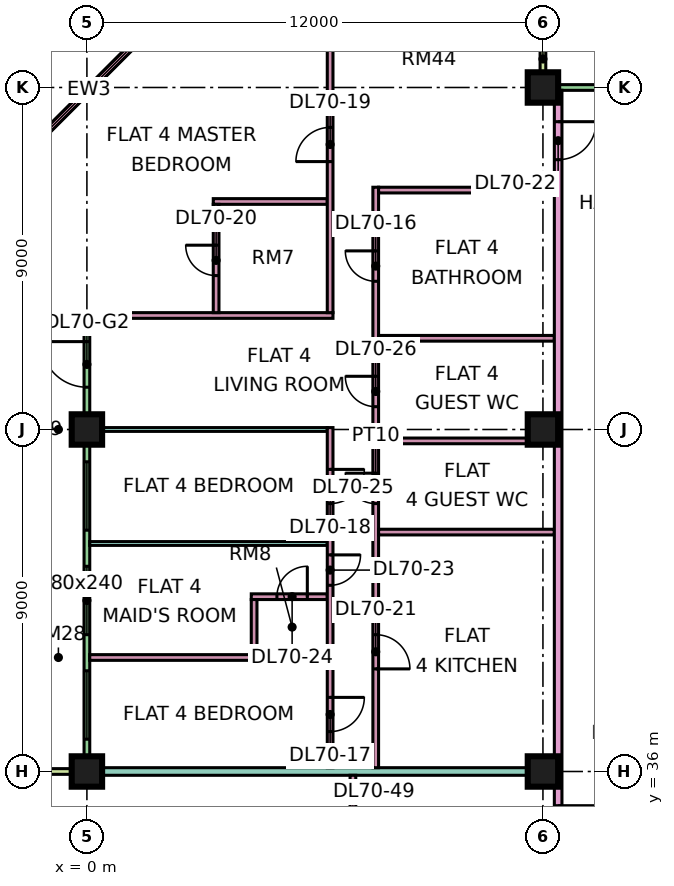
"""IFC4 building model, lengths in metres.
Left out: names, types, materials, properties, quantities, classifications, styles, units other than length and angle.
Written with IfcOpenShell. Run it as: python <this file> out.ifc"""

import sys

from ifc_helpers import new_model, si_unit, direction, frame, frame_2d, origin, origin_2d, place, context, subcontext, project, spatial, rectangle, extrude, element, fill, save


model = new_model("IFC4")
c1 = context("Model", 3, precision=1e-05, world=origin(), true_north=direction((0.0, 1.0)))
c2 = subcontext(c1, "Body", "Model", "MODEL_VIEW")
j1 = project(units=[si_unit("LENGTHUNIT", "METRE"), si_unit("PLANEANGLEUNIT", "RADIAN")], contexts=[c1])
p1 = place(None, origin())
s1 = spatial("IfcSite", under=j1, at=p1, CompositionType="ELEMENT")
p2 = place(p1, origin())
s2 = spatial("IfcBuilding", under=s1, at=p2, CompositionType="ELEMENT")
p3 = place(p2, frame((0.0, 0.0, 299.65)))
s3 = spatial("IfcBuildingStorey", under=s2, at=p3, CompositionType="ELEMENT", Elevation=299.65)
p4 = place(p3, frame((0.0, 36.0, 0.0), z_axis=(0.0, 0.0, 1.0), x_axis=(1.0, 0.0, 0.0)))
e1 = element("IfcColumn", 1, at=p4, inside=s3, PredefinedType="COLUMN", context=c2, shape_type="SweptSolid", body=[
    extrude(rectangle(XDim=0.8, YDim=0.8, at=origin_2d()), origin(), (0.0, 0.0, 1.0), 3.75),
])
for number, where, z_axis, x_axis in (
    (2, (0.0, 45.0, 0.0), (0.0, 0.0, 1.0), (1.0, 0.0, 0.0)),
    (3, (12.0, 36.0, 0.0), (0.0, 0.0, 1.0), (1.0, 0.0, 0.0)),
    (4, (12.0, 45.0, 0.0), (0.0, 0.0, 1.0), (1.0, 0.0, 0.0)),
    (5, (12.0, 54.0, 0.0), (0.0, 0.0, 1.0), (1.0, 0.0, 0.0)),
):
    element("IfcColumn", number, at=place(p3, frame(where, z_axis=z_axis, x_axis=x_axis)), inside=s3, PredefinedType="COLUMN", context=c2, shape_type="SweptSolid", body=[
        extrude(rectangle(XDim=0.8, YDim=0.8, at=origin_2d()), origin(), (0.0, 0.0, 1.0), 3.75),
    ])
p5 = place(p3, frame((22.425, 54.0, 0.0), z_axis=(0.0, 0.0, 1.0), x_axis=(-1.0, 0.0, 0.0)))
e6 = element("IfcWall", 6, at=p5, inside=s3, PredefinedType="SOLIDWALL", context=c2, shape_type="SweptSolid", body=[
    extrude(rectangle(XDim=10.35, YDim=0.15, at=frame_2d((5.175, 0.0))), origin(), (0.0, 0.0, 1.0), 3.35),
])
p6 = place(p5, frame((1.012, 0.0, 0.45)))
e7 = element("IfcOpeningElement", 7, at=p6, cuts=e6, PredefinedType="OPENING", context=c2, shape_type="SweptSolid", body=[
    extrude(rectangle(XDim=4.8, YDim=2.4, at=frame_2d((2.4, 1.2))), frame((0.0, 0.085, 0.0), z_axis=(0.0, -1.0, 0.0), x_axis=(1.0, 0.0, 0.0)), (0.0, 0.0, 1.0), 0.17),
])
p7 = place(p3, frame((12.0, 55.5, 0.0), z_axis=(0.0, 0.0, 1.0), x_axis=(0.0, -1.0, 0.0)))
e8 = element("IfcWall", 8, at=p7, inside=s3, PredefinedType="SOLIDWALL", context=c2, shape_type="SweptSolid", body=[
    extrude(rectangle(XDim=1.5, YDim=0.15, at=frame_2d((0.75, 0.0))), origin(), (0.0, 0.0, 1.0), 3.35),
])
p8 = place(p3, frame((1.553, 55.447, 0.0), z_axis=(0.0, 0.0, 1.0), x_axis=(-0.707106781187, -0.707106781187, 0.0)))
e9 = element("IfcWall", 9, at=p8, inside=s3, PredefinedType="SOLIDWALL", context=c2, shape_type="SweptSolid", body=[
    extrude(rectangle(XDim=4.243, YDim=0.15, at=frame_2d((2.121, 0.0))), origin(), (0.0, 0.0, 1.0), 3.35),
])
p9 = place(p8, frame((0.621, 0.0, 0.45)))
e10 = element("IfcOpeningElement", 10, at=p9, cuts=e9, PredefinedType="OPENING", context=c2, shape_type="SweptSolid", body=[
    extrude(rectangle(XDim=3.0, YDim=2.4, at=frame_2d((1.5, 1.2))), frame((0.0, 0.085, 0.0), z_axis=(0.0, -1.0, 0.0), x_axis=(1.0, 0.0, 0.0)), (0.0, 0.0, 1.0), 0.17),
])
p10 = place(p3, frame((0.0, 47.925, 0.0), z_axis=(0.0, 0.0, 1.0), x_axis=(0.0, -1.0, 0.0)))
e11 = element("IfcWall", 11, at=p10, inside=s3, PredefinedType="SOLIDWALL", context=c2, shape_type="SweptSolid", body=[
    extrude(rectangle(XDim=11.85, YDim=0.15, at=frame_2d((5.925, 0.0))), origin(), (0.0, 0.0, 1.0), 3.35),
])
p11 = place(p10, frame((0.613, 0.0, 0.0)))
e12 = element("IfcOpeningElement", 12, at=p11, cuts=e11, PredefinedType="OPENING", context=c2, shape_type="SweptSolid", body=[
    extrude(rectangle(XDim=1.2, YDim=2.4, at=frame_2d((0.6, 1.2))), frame((0.0, 0.085, 0.0), z_axis=(0.0, -1.0, 0.0), x_axis=(1.0, 0.0, 0.0)), (0.0, 0.0, 1.0), 0.17),
])
p12 = place(p10, frame((3.775, 0.0, 0.45)))
e13 = element("IfcOpeningElement", 13, at=p12, cuts=e11, PredefinedType="OPENING", context=c2, shape_type="SweptSolid", body=[
    extrude(rectangle(XDim=1.8, YDim=2.4, at=frame_2d((0.9, 1.2))), frame((0.0, 0.085, 0.0), z_axis=(0.0, -1.0, 0.0), x_axis=(1.0, 0.0, 0.0)), (0.0, 0.0, 1.0), 0.17),
])
p13 = place(p10, frame((6.525, 0.0, 0.45)))
e14 = element("IfcOpeningElement", 14, at=p13, cuts=e11, PredefinedType="OPENING", context=c2, shape_type="SweptSolid", body=[
    extrude(rectangle(XDim=1.8, YDim=2.4, at=frame_2d((0.9, 1.2))), frame((0.0, 0.085, 0.0), z_axis=(0.0, -1.0, 0.0), x_axis=(1.0, 0.0, 0.0)), (0.0, 0.0, 1.0), 0.17),
])
p14 = place(p10, frame((9.275, 0.0, 0.45)))
e15 = element("IfcOpeningElement", 15, at=p14, cuts=e11, PredefinedType="OPENING", context=c2, shape_type="SweptSolid", body=[
    extrude(rectangle(XDim=1.8, YDim=2.4, at=frame_2d((0.9, 1.2))), frame((0.0, 0.085, 0.0), z_axis=(0.0, -1.0, 0.0), x_axis=(1.0, 0.0, 0.0)), (0.0, 0.0, 1.0), 0.17),
])
for number, where, z_axis, x_axis in (
    (16, (-1.5, 48.0, 0.0), (0.0, 0.0, 1.0), (1.0, 0.0, 0.0)),
    (17, (-1.5, 36.0, 0.0), (0.0, 0.0, 1.0), (1.0, 0.0, 0.0)),
):
    element("IfcWall", number, at=place(p3, frame(where, z_axis=z_axis, x_axis=x_axis)), inside=s3, PredefinedType="SOLIDWALL", context=c2, shape_type="SweptSolid", body=[
        extrude(rectangle(XDim=1.5, YDim=0.15, at=frame_2d((0.75, 0.0))), origin(), (0.0, 0.0, 1.0), 3.35),
    ])
e18 = element("IfcWall", 18, at=p4, inside=s3, PredefinedType="PARTITIONING", context=c2, shape_type="SweptSolid", body=[
    extrude(rectangle(XDim=12.3, YDim=0.2, at=frame_2d((6.15, 0.0))), origin(), (0.0, 0.0, 1.0), 3.35),
])
p15 = place(p3, frame((0.0, 48.0, 0.0), z_axis=(0.0, 0.0, 1.0), x_axis=(1.0, 0.0, 0.0)))
e19 = element("IfcWall", 19, at=p15, inside=s3, PredefinedType="PARTITIONING", context=c2, shape_type="SweptSolid", body=[
    extrude(rectangle(XDim=6.475, YDim=0.15, at=frame_2d((3.238, 0.0))), origin(), (0.0, 0.0, 1.0), 3.35),
])
p16 = place(p3, frame((0.074, 39.0, 0.0), z_axis=(0.0, 0.0, 1.0), x_axis=(1.0, 0.0, 0.0)))
e20 = element("IfcWall", 20, at=p16, inside=s3, PredefinedType="PARTITIONING", context=c2, shape_type="SweptSolid", body=[
    extrude(rectangle(XDim=6.251, YDim=0.15, at=frame_2d((3.125, 0.0))), origin(), (0.0, 0.0, 1.0), 3.35),
])
for number, where, z_axis, x_axis in (
    (21, (0.074, 42.0, 0.0), (0.0, 0.0, 1.0), (1.0, 0.0, 0.0)),
    (22, (0.074, 45.0, 0.0), (0.0, 0.0, 1.0), (1.0, 0.0, 0.0)),
):
    element("IfcWall", number, at=place(p3, frame(where, z_axis=z_axis, x_axis=x_axis)), inside=s3, PredefinedType="PARTITIONING", context=c2, shape_type="SweptSolid", body=[
        extrude(rectangle(XDim=6.251, YDim=0.1, at=frame_2d((3.125, 0.0))), origin(), (0.0, 0.0, 1.0), 3.35),
    ])
p17 = place(p3, frame((3.325, 51.0, 0.0), z_axis=(0.0, 0.0, 1.0), x_axis=(1.0, 0.0, 0.0)))
e23 = element("IfcWall", 23, at=p17, inside=s3, PredefinedType="PARTITIONING", context=c2, shape_type="SweptSolid", body=[
    extrude(rectangle(XDim=3.0, YDim=0.15, at=frame_2d((1.5, 0.0))), origin(), (0.0, 0.0, 1.0), 3.35),
])
p18 = place(p3, frame((3.4, 48.075, 0.0), z_axis=(0.0, 0.0, 1.0), x_axis=(0.0, 1.0, 0.0)))
e24 = element("IfcWall", 24, at=p18, inside=s3, PredefinedType="PARTITIONING", context=c2, shape_type="SweptSolid", body=[
    extrude(rectangle(XDim=2.85, YDim=0.15, at=frame_2d((1.425, 0.0))), origin(), (0.0, 0.0, 1.0), 3.35),
])
p19 = place(p18, frame((0.975, 0.0, 0.0)))
e25 = element("IfcOpeningElement", 25, at=p19, cuts=e24, PredefinedType="OPENING", context=c2, shape_type="SweptSolid", body=[
    extrude(rectangle(XDim=0.8, YDim=2.1, at=frame_2d((0.4, 1.05))), frame((0.0, 0.085, 0.0), z_axis=(0.0, -1.0, 0.0), x_axis=(1.0, 0.0, 0.0)), (0.0, 0.0, 1.0), 0.17),
])
p20 = place(p3, frame((4.325, 40.6, 0.0), z_axis=(0.0, 0.0, 1.0), x_axis=(1.0, 0.0, 0.0)))
e26 = element("IfcWall", 26, at=p20, inside=s3, PredefinedType="PARTITIONING", context=c2, shape_type="SweptSolid", body=[
    extrude(rectangle(XDim=2.0, YDim=0.15, at=frame_2d((1.0, 0.0))), origin(), (0.0, 0.0, 1.0), 3.35),
])
p21 = place(p20, frame((0.675, 0.0, 0.0)))
e27 = element("IfcOpeningElement", 27, at=p21, cuts=e26, PredefinedType="OPENING", context=c2, shape_type="SweptSolid", body=[
    extrude(rectangle(XDim=0.8, YDim=2.1, at=frame_2d((0.4, 1.05))), frame((0.0, 0.085, 0.0), z_axis=(0.0, -1.0, 0.0), x_axis=(1.0, 0.0, 0.0)), (0.0, 0.0, 1.0), 0.17),
])
p22 = place(p3, frame((4.4, 39.075, 0.0), z_axis=(0.0, 0.0, 1.0), x_axis=(0.0, 1.0, 0.0)))
e28 = element("IfcWall", 28, at=p22, inside=s3, PredefinedType="PARTITIONING", context=c2, shape_type="SweptSolid", body=[
    extrude(rectangle(XDim=1.45, YDim=0.15, at=frame_2d((0.725, 0.0))), origin(), (0.0, 0.0, 1.0), 3.35),
])
p23 = place(p3, frame((6.4, 36.1, 0.0), z_axis=(0.0, 0.0, 1.0), x_axis=(0.0, 1.0, 0.0)))
e29 = element("IfcWall", 29, at=p23, inside=s3, PredefinedType="PARTITIONING", context=c2, shape_type="SweptSolid", body=[
    extrude(rectangle(XDim=8.95, YDim=0.15, at=frame_2d((4.475, 0.0))), origin(), (0.0, 0.0, 1.0), 3.35),
])
p24 = place(p23, frame((0.95, 0.0, 0.0)))
e30 = element("IfcOpeningElement", 30, at=p24, cuts=e29, PredefinedType="OPENING", context=c2, shape_type="SweptSolid", body=[
    extrude(rectangle(XDim=0.9, YDim=2.1, at=frame_2d((0.45, 1.05))), frame((0.0, 0.085, 0.0), z_axis=(0.0, -1.0, 0.0), x_axis=(1.0, 0.0, 0.0)), (0.0, 0.0, 1.0), 0.17),
])
p25 = place(p23, frame((6.95, 0.0, 0.0)))
e31 = element("IfcOpeningElement", 31, at=p25, cuts=e29, PredefinedType="OPENING", context=c2, shape_type="SweptSolid", body=[
    extrude(rectangle(XDim=0.9, YDim=2.1, at=frame_2d((0.45, 1.05))), frame((0.0, 0.085, 0.0), z_axis=(0.0, -1.0, 0.0), x_axis=(1.0, 0.0, 0.0)), (0.0, 0.0, 1.0), 0.17),
])
p26 = place(p23, frame((4.8, 0.0, 0.0)))
e32 = element("IfcOpeningElement", 32, at=p26, cuts=e29, PredefinedType="OPENING", context=c2, shape_type="SweptSolid", body=[
    extrude(rectangle(XDim=0.8, YDim=2.1, at=frame_2d((0.4, 1.05))), frame((0.0, 0.085, 0.0), z_axis=(0.0, -1.0, 0.0), x_axis=(1.0, 0.0, 0.0)), (0.0, 0.0, 1.0), 0.17),
])
p27 = place(p3, frame((6.4, 48.075, 0.0), z_axis=(0.0, 0.0, 1.0), x_axis=(0.0, 1.0, 0.0)))
e33 = element("IfcWall", 33, at=p27, inside=s3, PredefinedType="PARTITIONING", context=c2, shape_type="SweptSolid", body=[
    extrude(rectangle(XDim=7.275, YDim=0.15, at=frame_2d((3.638, 0.0))), origin(), (0.0, 0.0, 1.0), 3.35),
])
p28 = place(p27, frame((3.975, 0.0, 0.0)))
e34 = element("IfcOpeningElement", 34, at=p28, cuts=e33, PredefinedType="OPENING", context=c2, shape_type="SweptSolid", body=[
    extrude(rectangle(XDim=0.9, YDim=2.1, at=frame_2d((0.45, 1.05))), frame((0.0, 0.085, 0.0), z_axis=(0.0, -1.0, 0.0), x_axis=(1.0, 0.0, 0.0)), (0.0, 0.0, 1.0), 0.17),
])
p29 = place(p3, frame((7.0, 30.075, 0.0), z_axis=(0.0, 0.0, 1.0), x_axis=(0.0, 1.0, 0.0)))
e35 = element("IfcWall", 35, at=p29, inside=s3, PredefinedType="PARTITIONING", context=c2, shape_type="SweptSolid", body=[
    extrude(rectangle(XDim=5.825, YDim=0.15, at=frame_2d((2.913, 0.0))), origin(), (0.0, 0.0, 1.0), 3.35),
])
p30 = place(p29, frame((3.975, 0.0, 0.0)))
e36 = element("IfcOpeningElement", 36, at=p30, cuts=e35, PredefinedType="OPENING", context=c2, shape_type="SweptSolid", body=[
    extrude(rectangle(XDim=0.9, YDim=2.1, at=frame_2d((0.45, 1.05))), frame((0.0, 0.085, 0.0), z_axis=(0.0, -1.0, 0.0), x_axis=(1.0, 0.0, 0.0)), (0.0, 0.0, 1.0), 0.17),
])
p31 = place(p3, frame((7.6, 36.1, 0.0), z_axis=(0.0, 0.0, 1.0), x_axis=(0.0, 1.0, 0.0)))
e37 = element("IfcWall", 37, at=p31, inside=s3, PredefinedType="PARTITIONING", context=c2, shape_type="SweptSolid", body=[
    extrude(rectangle(XDim=15.275, YDim=0.15, at=frame_2d((7.637, 0.0))), origin(), (0.0, 0.0, 1.0), 3.35),
])
p32 = place(p31, frame((12.8, 0.0, 0.0)))
e38 = element("IfcOpeningElement", 38, at=p32, cuts=e37, PredefinedType="OPENING", context=c2, shape_type="SweptSolid", body=[
    extrude(rectangle(XDim=0.8, YDim=2.1, at=frame_2d((0.4, 1.05))), frame((0.0, 0.085, 0.0), z_axis=(0.0, -1.0, 0.0), x_axis=(1.0, 0.0, 0.0)), (0.0, 0.0, 1.0), 0.17),
])
p33 = place(p31, frame((2.6, 0.0, 0.0)))
e39 = element("IfcOpeningElement", 39, at=p33, cuts=e37, PredefinedType="OPENING", context=c2, shape_type="SweptSolid", body=[
    extrude(rectangle(XDim=0.9, YDim=2.1, at=frame_2d((0.45, 1.05))), frame((0.0, 0.085, 0.0), z_axis=(0.0, -1.0, 0.0), x_axis=(1.0, 0.0, 0.0)), (0.0, 0.0, 1.0), 0.17),
])
p34 = place(p31, frame((6.95, 0.0, 0.0)))
e40 = element("IfcOpeningElement", 40, at=p34, cuts=e37, PredefinedType="OPENING", context=c2, shape_type="SweptSolid", body=[
    extrude(rectangle(XDim=0.8, YDim=2.1, at=frame_2d((0.4, 1.05))), frame((0.0, 0.085, 0.0), z_axis=(0.0, -1.0, 0.0), x_axis=(1.0, 0.0, 0.0)), (0.0, 0.0, 1.0), 0.17),
])
p35 = place(p31, frame((9.5, 0.0, 0.0)))
e41 = element("IfcOpeningElement", 41, at=p35, cuts=e37, PredefinedType="OPENING", context=c2, shape_type="SweptSolid", body=[
    extrude(rectangle(XDim=0.8, YDim=2.1, at=frame_2d((0.4, 1.05))), frame((0.0, 0.085, 0.0), z_axis=(0.0, -1.0, 0.0), x_axis=(1.0, 0.0, 0.0)), (0.0, 0.0, 1.0), 0.17),
])
for number, where, z_axis, x_axis in (
    (42, (7.675, 42.3, 0.0), (0.0, 0.0, 1.0), (1.0, 0.0, 0.0)),
    (43, (7.675, 44.7, 0.0), (0.0, 0.0, 1.0), (1.0, 0.0, 0.0)),
    (44, (7.675, 47.4, 0.0), (0.0, 0.0, 1.0), (1.0, 0.0, 0.0)),
    (45, (7.675, 51.3, 0.0), (0.0, 0.0, 1.0), (1.0, 0.0, 0.0)),
):
    element("IfcWall", number, at=place(p3, frame(where, z_axis=z_axis, x_axis=x_axis)), inside=s3, PredefinedType="PARTITIONING", context=c2, shape_type="SweptSolid", body=[
        extrude(rectangle(XDim=4.625, YDim=0.15, at=frame_2d((2.312, 0.0))), origin(), (0.0, 0.0, 1.0), 3.35),
    ])
p36 = place(p3, frame((12.4, 20.0, 0.0), z_axis=(0.0, 0.0, 1.0), x_axis=(0.0, 1.0, 0.0)))
e46 = element("IfcWall", 46, at=p36, inside=s3, PredefinedType="PARTITIONING", context=c2, shape_type="SweptSolid", body=[
    extrude(rectangle(XDim=33.926, YDim=0.2, at=frame_2d((16.963, 0.0))), origin(), (0.0, 0.0, 1.0), 3.35),
])
p37 = place(p36, frame((32.1, 0.0, 0.0)))
e47 = element("IfcOpeningElement", 47, at=p37, cuts=e46, PredefinedType="OPENING", context=c2, shape_type="SweptSolid", body=[
    extrude(rectangle(XDim=1.0, YDim=2.1, at=frame_2d((0.5, 1.05))), frame((0.0, 0.11, 0.0), z_axis=(0.0, -1.0, 0.0), x_axis=(1.0, 0.0, 0.0)), (0.0, 0.0, 1.0), 0.22),
])
p38 = place(p36, frame((0.6, 0.0, 0.0)))
e48 = element("IfcOpeningElement", 48, at=p38, cuts=e46, PredefinedType="OPENING", context=c2, shape_type="SweptSolid", body=[
    extrude(rectangle(XDim=1.2, YDim=2.1, at=frame_2d((0.6, 1.05))), frame((0.0, 0.11, 0.0), z_axis=(0.0, -1.0, 0.0), x_axis=(1.0, 0.0, 0.0)), (0.0, 0.0, 1.0), 0.22),
])
p39 = place(p36, frame((14.1, 0.0, 0.0)))
e49 = element("IfcOpeningElement", 49, at=p39, cuts=e46, PredefinedType="OPENING", context=c2, shape_type="SweptSolid", body=[
    extrude(rectangle(XDim=1.0, YDim=2.1, at=frame_2d((0.5, 1.05))), frame((0.0, 0.11, 0.0), z_axis=(0.0, -1.0, 0.0), x_axis=(1.0, 0.0, 0.0)), (0.0, 0.0, 1.0), 0.22),
])
p40 = place(p9, origin())
e50 = element("IfcWindow", 50, at=p40, inside=s3, PartitioningType="SINGLE_PANEL", PredefinedType="WINDOW", context=c2, shape_type="SweptSolid", body=[
    extrude(rectangle(XDim=3.0, YDim=2.4, at=frame_2d((1.5, 1.2))), frame((0.0, 0.03, 0.0), z_axis=(0.0, -1.0, 0.0), x_axis=(1.0, 0.0, 0.0)), (0.0, 0.0, 1.0), 0.06),
])
fill(e10, e50)
p41 = place(p11, frame((1.2, 0.0, 0.0), z_axis=(0.0, 0.0, 1.0), x_axis=(-1.0, 0.0, 0.0)))
e51 = element("IfcDoor", 51, at=p41, inside=s3, OperationType="DOUBLE_DOOR_SINGLE_SWING", PredefinedType="DOOR", context=c2, shape_type="SweptSolid", body=[
    extrude(rectangle(XDim=1.2, YDim=2.4, at=frame_2d((0.6, 1.2))), frame((0.0, 0.025, 0.0), z_axis=(0.0, -1.0, 0.0), x_axis=(1.0, 0.0, 0.0)), (0.0, 0.0, 1.0), 0.05),
])
fill(e12, e51)
p42 = place(p12, origin())
e52 = element("IfcWindow", 52, at=p42, inside=s3, PartitioningType="SINGLE_PANEL", PredefinedType="WINDOW", context=c2, shape_type="SweptSolid", body=[
    extrude(rectangle(XDim=1.8, YDim=2.4, at=frame_2d((0.9, 1.2))), frame((0.0, 0.03, 0.0), z_axis=(0.0, -1.0, 0.0), x_axis=(1.0, 0.0, 0.0)), (0.0, 0.0, 1.0), 0.06),
])
fill(e13, e52)
p43 = place(p13, origin())
e53 = element("IfcWindow", 53, at=p43, inside=s3, PartitioningType="SINGLE_PANEL", PredefinedType="WINDOW", context=c2, shape_type="SweptSolid", body=[
    extrude(rectangle(XDim=1.8, YDim=2.4, at=frame_2d((0.9, 1.2))), frame((0.0, 0.03, 0.0), z_axis=(0.0, -1.0, 0.0), x_axis=(1.0, 0.0, 0.0)), (0.0, 0.0, 1.0), 0.06),
])
fill(e14, e53)
p44 = place(p14, origin())
e54 = element("IfcWindow", 54, at=p44, inside=s3, PartitioningType="SINGLE_PANEL", PredefinedType="WINDOW", context=c2, shape_type="SweptSolid", body=[
    extrude(rectangle(XDim=1.8, YDim=2.4, at=frame_2d((0.9, 1.2))), frame((0.0, 0.03, 0.0), z_axis=(0.0, -1.0, 0.0), x_axis=(1.0, 0.0, 0.0)), (0.0, 0.0, 1.0), 0.06),
])
fill(e15, e54)
p45 = place(p32, frame((0.8, 0.0, 0.0), z_axis=(0.0, 0.0, 1.0), x_axis=(-1.0, 0.0, 0.0)))
e55 = element("IfcDoor", 55, at=p45, inside=s3, OperationType="SINGLE_SWING_RIGHT", PredefinedType="DOOR", context=c2, shape_type="SweptSolid", body=[
    extrude(rectangle(XDim=0.8, YDim=2.1, at=frame_2d((0.4, 1.05))), frame((0.0, 0.025, 0.0), z_axis=(0.0, -1.0, 0.0), x_axis=(1.0, 0.0, 0.0)), (0.0, 0.0, 1.0), 0.05),
])
fill(e38, e55)
p46 = place(p24, origin())
e56 = element("IfcDoor", 56, at=p46, inside=s3, OperationType="SINGLE_SWING_RIGHT", PredefinedType="DOOR", context=c2, shape_type="SweptSolid", body=[
    extrude(rectangle(XDim=0.9, YDim=2.1, at=frame_2d((0.45, 1.05))), frame((0.0, 0.025, 0.0), z_axis=(0.0, -1.0, 0.0), x_axis=(1.0, 0.0, 0.0)), (0.0, 0.0, 1.0), 0.05),
])
fill(e30, e56)
p47 = place(p25, origin())
e57 = element("IfcDoor", 57, at=p47, inside=s3, OperationType="SINGLE_SWING_RIGHT", PredefinedType="DOOR", context=c2, shape_type="SweptSolid", body=[
    extrude(rectangle(XDim=0.9, YDim=2.1, at=frame_2d((0.45, 1.05))), frame((0.0, 0.025, 0.0), z_axis=(0.0, -1.0, 0.0), x_axis=(1.0, 0.0, 0.0)), (0.0, 0.0, 1.0), 0.05),
])
fill(e31, e57)
p48 = place(p28, origin())
e58 = element("IfcDoor", 58, at=p48, inside=s3, OperationType="SINGLE_SWING_LEFT", PredefinedType="DOOR", context=c2, shape_type="SweptSolid", body=[
    extrude(rectangle(XDim=0.9, YDim=2.1, at=frame_2d((0.45, 1.05))), frame((0.0, 0.025, 0.0), z_axis=(0.0, -1.0, 0.0), x_axis=(1.0, 0.0, 0.0)), (0.0, 0.0, 1.0), 0.05),
])
fill(e34, e58)
p49 = place(p19, frame((0.8, 0.0, 0.0), z_axis=(0.0, 0.0, 1.0), x_axis=(-1.0, 0.0, 0.0)))
e59 = element("IfcDoor", 59, at=p49, inside=s3, OperationType="SINGLE_SWING_RIGHT", PredefinedType="DOOR", context=c2, shape_type="SweptSolid", body=[
    extrude(rectangle(XDim=0.8, YDim=2.1, at=frame_2d((0.4, 1.05))), frame((0.0, 0.025, 0.0), z_axis=(0.0, -1.0, 0.0), x_axis=(1.0, 0.0, 0.0)), (0.0, 0.0, 1.0), 0.05),
])
fill(e25, e59)
p50 = place(p33, frame((0.9, 0.0, 0.0), z_axis=(0.0, 0.0, 1.0), x_axis=(-1.0, 0.0, 0.0)))
e60 = element("IfcDoor", 60, at=p50, inside=s3, OperationType="SINGLE_SWING_LEFT", PredefinedType="DOOR", context=c2, shape_type="SweptSolid", body=[
    extrude(rectangle(XDim=0.9, YDim=2.1, at=frame_2d((0.45, 1.05))), frame((0.0, 0.025, 0.0), z_axis=(0.0, -1.0, 0.0), x_axis=(1.0, 0.0, 0.0)), (0.0, 0.0, 1.0), 0.05),
])
fill(e39, e60)
p51 = place(p37, origin())
e61 = element("IfcDoor", 61, at=p51, inside=s3, OperationType="SINGLE_SWING_RIGHT", PredefinedType="DOOR", context=c2, shape_type="SweptSolid", body=[
    extrude(rectangle(XDim=1.0, YDim=2.1, at=frame_2d((0.5, 1.05))), frame((0.0, 0.025, 0.0), z_axis=(0.0, -1.0, 0.0), x_axis=(1.0, 0.0, 0.0)), (0.0, 0.0, 1.0), 0.05),
])
fill(e47, e61)
p52 = place(p26, origin())
e62 = element("IfcDoor", 62, at=p52, inside=s3, OperationType="SINGLE_SWING_RIGHT", PredefinedType="DOOR", context=c2, shape_type="SweptSolid", body=[
    extrude(rectangle(XDim=0.8, YDim=2.1, at=frame_2d((0.4, 1.05))), frame((0.0, 0.025, 0.0), z_axis=(0.0, -1.0, 0.0), x_axis=(1.0, 0.0, 0.0)), (0.0, 0.0, 1.0), 0.05),
])
fill(e32, e62)
p53 = place(p21, frame((0.8, 0.0, 0.0), z_axis=(0.0, 0.0, 1.0), x_axis=(-1.0, 0.0, 0.0)))
e63 = element("IfcDoor", 63, at=p53, inside=s3, OperationType="SINGLE_SWING_RIGHT", PredefinedType="DOOR", context=c2, shape_type="SweptSolid", body=[
    extrude(rectangle(XDim=0.8, YDim=2.1, at=frame_2d((0.4, 1.05))), frame((0.0, 0.025, 0.0), z_axis=(0.0, -1.0, 0.0), x_axis=(1.0, 0.0, 0.0)), (0.0, 0.0, 1.0), 0.05),
])
fill(e27, e63)
p54 = place(p34, frame((0.8, 0.0, 0.0), z_axis=(0.0, 0.0, 1.0), x_axis=(-1.0, 0.0, 0.0)))
e64 = element("IfcDoor", 64, at=p54, inside=s3, OperationType="SINGLE_SWING_RIGHT", PredefinedType="DOOR", context=c2, shape_type="SweptSolid", body=[
    extrude(rectangle(XDim=0.8, YDim=2.1, at=frame_2d((0.4, 1.05))), frame((0.0, 0.025, 0.0), z_axis=(0.0, -1.0, 0.0), x_axis=(1.0, 0.0, 0.0)), (0.0, 0.0, 1.0), 0.05),
])
fill(e40, e64)
p55 = place(p35, frame((0.8, 0.0, 0.0), z_axis=(0.0, 0.0, 1.0), x_axis=(-1.0, 0.0, 0.0)))
e65 = element("IfcDoor", 65, at=p55, inside=s3, OperationType="SINGLE_SWING_RIGHT", PredefinedType="DOOR", context=c2, shape_type="SweptSolid", body=[
    extrude(rectangle(XDim=0.8, YDim=2.1, at=frame_2d((0.4, 1.05))), frame((0.0, 0.025, 0.0), z_axis=(0.0, -1.0, 0.0), x_axis=(1.0, 0.0, 0.0)), (0.0, 0.0, 1.0), 0.05),
])
fill(e41, e65)
p56 = place(p39, origin())
e66 = element("IfcDoor", 66, at=p56, inside=s3, OperationType="SINGLE_SWING_RIGHT", PredefinedType="DOOR", context=c2, shape_type="SweptSolid", body=[
    extrude(rectangle(XDim=1.0, YDim=2.1, at=frame_2d((0.5, 1.05))), frame((0.0, 0.025, 0.0), z_axis=(0.0, -1.0, 0.0), x_axis=(1.0, 0.0, 0.0)), (0.0, 0.0, 1.0), 0.05),
])
fill(e49, e66)
save(model, sys.argv[1])
